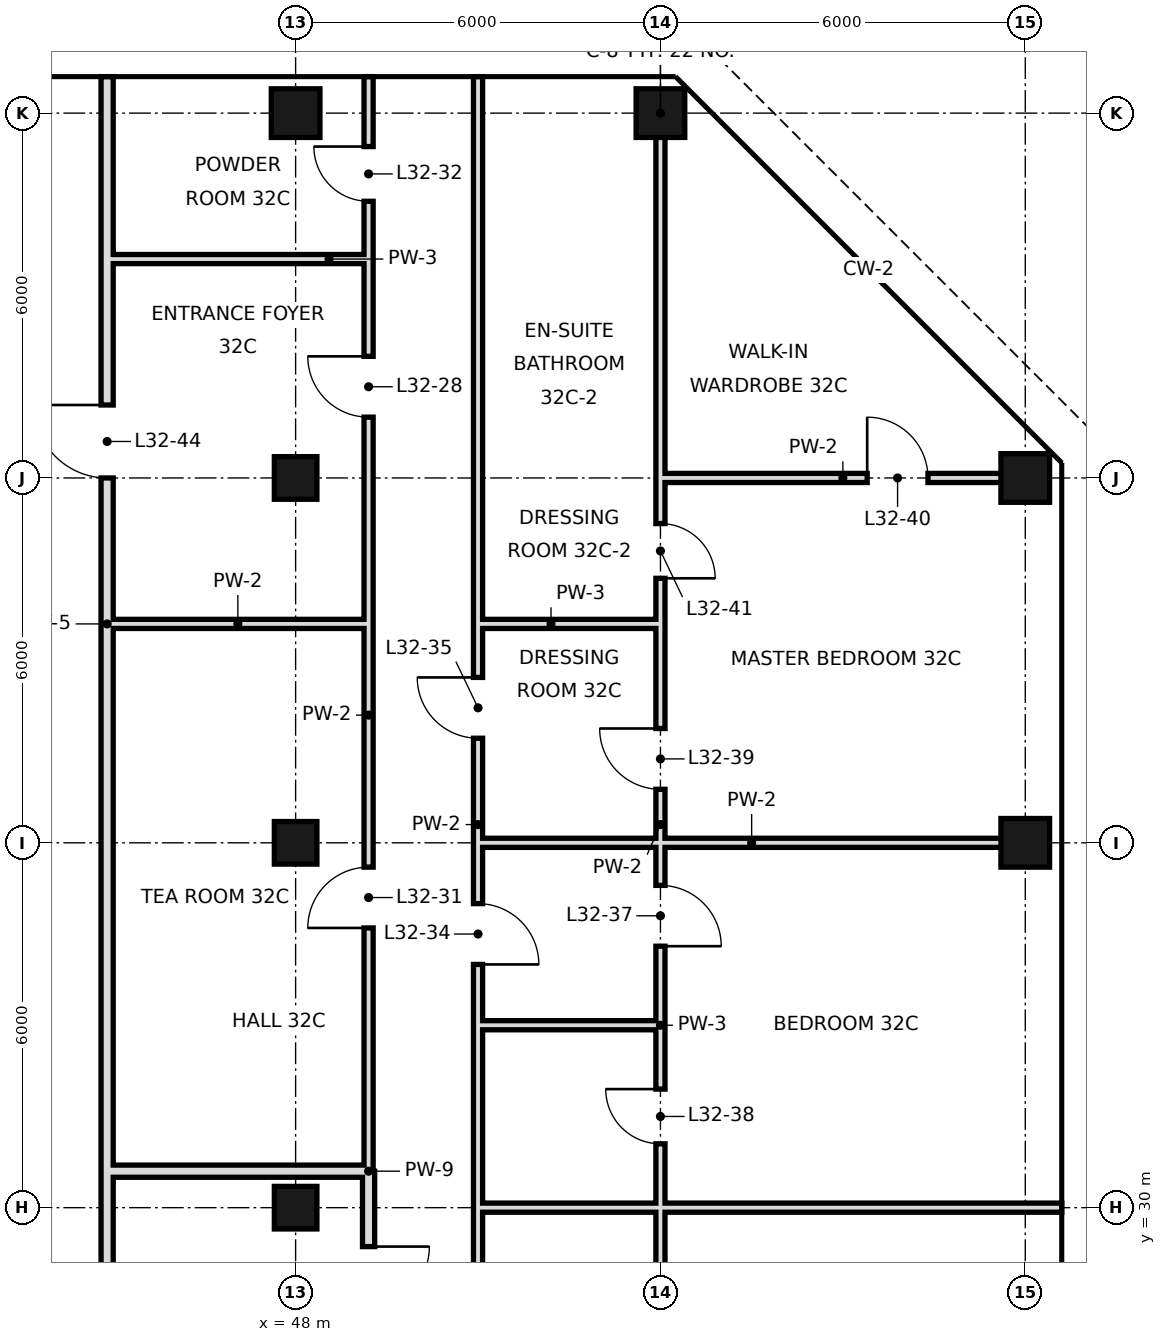
"""IFC4 building model, lengths in metres.
Left out: names, types, materials, properties, quantities, classifications, styles, units other than length and angle.
Written with IfcOpenShell. Run it as: python <this file> out.ifc"""

import sys

from ifc_helpers import new_model, si_unit, direction, frame, frame_2d, origin, origin_2d, place, context, subcontext, project, spatial, rectangle, hollow_rectangle, extrude, element, fill, save


model = new_model("IFC4")
c1 = context("Model", 3, precision=1e-05, world=origin(), true_north=direction((0.0, 1.0)))
c2 = subcontext(c1, "Body", "Model", "MODEL_VIEW")
j1 = project(units=[si_unit("LENGTHUNIT", "METRE"), si_unit("PLANEANGLEUNIT", "RADIAN")], contexts=[c1])
p1 = place(None, origin())
s1 = spatial("IfcSite", under=j1, at=p1, CompositionType="ELEMENT")
p2 = place(p1, origin())
s2 = spatial("IfcBuilding", under=s1, at=p2, CompositionType="ELEMENT")
p3 = place(p2, frame((0.0, 0.0, 143.8)))
s3 = spatial("IfcBuildingStorey", under=s2, at=p3, CompositionType="ELEMENT", Elevation=143.8)
for number, where, z_axis, x_axis in (
    (1, (48.0, 30.0, 0.0), (0.0, 0.0, 1.0), (1.0, 0.0, 0.0)),
    (2, (48.0, 36.0, 0.0), (0.0, 0.0, 1.0), (1.0, 0.0, 0.0)),
    (3, (48.0, 42.0, 0.0), (0.0, 0.0, 1.0), (1.0, 0.0, 0.0)),
):
    element("IfcColumn", number, at=place(p3, frame(where, z_axis=z_axis, x_axis=x_axis)), inside=s3, PredefinedType="COLUMN", context=c2, shape_type="SweptSolid", body=[
        extrude(hollow_rectangle(XDim=0.7, YDim=0.7, WallThickness=0.036, at=origin_2d()), origin(), (0.0, 0.0, 1.0), 3.6),
    ])
for number, where, z_axis, x_axis in (
    (4, (48.0, 48.0, 0.0), (0.0, 0.0, 1.0), (1.0, 0.0, 0.0)),
    (5, (54.0, 48.0, 0.0), (0.0, 0.0, 1.0), (1.0, 0.0, 0.0)),
    (6, (60.0, 36.0, 0.0), (0.0, 0.0, 1.0), (1.0, 0.0, 0.0)),
    (7, (60.0, 42.0, 0.0), (0.0, 0.0, 1.0), (1.0, 0.0, 0.0)),
):
    element("IfcColumn", number, at=place(p3, frame(where, z_axis=z_axis, x_axis=x_axis)), inside=s3, PredefinedType="COLUMN", context=c2, shape_type="SweptSolid", body=[
        extrude(hollow_rectangle(XDim=0.8, YDim=0.8, WallThickness=0.04, at=origin_2d()), origin(), (0.0, 0.0, 1.0), 3.6),
    ])
p4 = place(p3, frame((44.9, 30.6, 0.0), z_axis=(0.0, 0.0, 1.0), x_axis=(0.0, 1.0, 0.0)))
e8 = element("IfcWall", 8, at=p4, inside=s3, PredefinedType="SOLIDWALL", context=c2, shape_type="SweptSolid", body=[
    extrude(rectangle(XDim=18.0, YDim=0.2, at=frame_2d((9.0, 0.0))), origin(), (0.0, 0.0, 1.0), 2.72),
])
p5 = place(p4, frame((11.4, 0.0, 0.0)))
e9 = element("IfcOpeningElement", 9, at=p5, cuts=e8, PredefinedType="OPENING", context=c2, shape_type="SweptSolid", body=[
    extrude(rectangle(XDim=1.2, YDim=2.4, at=frame_2d((0.6, 1.2))), frame((0.0, 0.11, 0.0), z_axis=(0.0, -1.0, 0.0), x_axis=(1.0, 0.0, 0.0)), (0.0, 0.0, 1.0), 0.22),
])
p6 = place(p3, frame((44.9, 25.8, 0.0), z_axis=(0.0, 0.0, 1.0), x_axis=(0.0, 1.0, 0.0)))
e10 = element("IfcWall", 10, at=p6, inside=s3, PredefinedType="SOLIDWALL", context=c2, shape_type="SweptSolid", body=[
    extrude(rectangle(XDim=4.8, YDim=0.2, at=frame_2d((2.4, 0.0))), origin(), (0.0, 0.0, 1.0), 2.97),
])
p7 = place(p3, frame((49.2, 25.8, 0.0), z_axis=(0.0, 0.0, 1.0), x_axis=(0.0, 1.0, 0.0)))
e11 = element("IfcWall", 11, at=p7, inside=s3, PredefinedType="SOLIDWALL", context=c2, shape_type="SweptSolid", body=[
    extrude(rectangle(XDim=4.8, YDim=0.2, at=frame_2d((2.4, 0.0))), origin(), (0.0, 0.0, 1.0), 2.72),
])
p8 = place(p7, frame((2.56, 0.0, 0.0)))
e12 = element("IfcOpeningElement", 12, at=p8, cuts=e11, PredefinedType="OPENING", context=c2, shape_type="SweptSolid", body=[
    extrude(rectangle(XDim=1.0, YDim=2.4, at=frame_2d((0.5, 1.2))), frame((0.0, 0.11, 0.0), z_axis=(0.0, -1.0, 0.0), x_axis=(1.0, 0.0, 0.0)), (0.0, 0.0, 1.0), 0.22),
])
p9 = place(p3, frame((49.2, 30.6, 0.0), z_axis=(0.0, 0.0, 1.0), x_axis=(0.0, 1.0, 0.0)))
e13 = element("IfcWall", 13, at=p9, inside=s3, PredefinedType="PARTITIONING", context=c2, shape_type="SweptSolid", body=[
    extrude(rectangle(XDim=15.0, YDim=0.15, at=frame_2d((7.5, 0.0))), origin(), (0.0, 0.0, 1.0), 3.42),
])
p10 = place(p9, frame((12.4, 0.0, 0.0)))
e14 = element("IfcOpeningElement", 14, at=p10, cuts=e13, PredefinedType="OPENING", context=c2, shape_type="SweptSolid", body=[
    extrude(rectangle(XDim=1.0, YDim=2.4, at=frame_2d((0.5, 1.2))), frame((0.0, 0.085, 0.0), z_axis=(0.0, -1.0, 0.0), x_axis=(1.0, 0.0, 0.0)), (0.0, 0.0, 1.0), 0.17),
])
p11 = place(p9, frame((4.0, 0.0, 0.0)))
e15 = element("IfcOpeningElement", 15, at=p11, cuts=e13, PredefinedType="OPENING", context=c2, shape_type="SweptSolid", body=[
    extrude(rectangle(XDim=1.0, YDim=2.4, at=frame_2d((0.5, 1.2))), frame((0.0, 0.085, 0.0), z_axis=(0.0, -1.0, 0.0), x_axis=(1.0, 0.0, 0.0)), (0.0, 0.0, 1.0), 0.17),
])
p12 = place(p3, frame((49.2, 45.6, 0.0), z_axis=(0.0, 0.0, 1.0), x_axis=(0.0, 1.0, 0.0)))
e16 = element("IfcWall", 16, at=p12, inside=s3, PredefinedType="PARTITIONING", context=c2, shape_type="SweptSolid", body=[
    extrude(rectangle(XDim=3.0, YDim=0.15, at=frame_2d((1.5, 0.0))), origin(), (0.0, 0.0, 1.0), 3.42),
])
p13 = place(p12, frame((0.95, 0.0, 0.0)))
e17 = element("IfcOpeningElement", 17, at=p13, cuts=e16, PredefinedType="OPENING", context=c2, shape_type="SweptSolid", body=[
    extrude(rectangle(XDim=0.9, YDim=2.4, at=frame_2d((0.45, 1.2))), frame((0.0, 0.085, 0.0), z_axis=(0.0, -1.0, 0.0), x_axis=(1.0, 0.0, 0.0)), (0.0, 0.0, 1.0), 0.17),
])
p14 = place(p3, frame((51.0, 18.0, 0.0), z_axis=(0.0, 0.0, 1.0), x_axis=(0.0, 1.0, 0.0)))
e18 = element("IfcWall", 18, at=p14, inside=s3, PredefinedType="PARTITIONING", context=c2, shape_type="SweptSolid", body=[
    extrude(rectangle(XDim=12.0, YDim=0.15, at=frame_2d((6.0, 0.0))), origin(), (0.0, 0.0, 1.0), 3.42),
])
p15 = place(p14, frame((5.1, 0.0, 0.0)))
e19 = element("IfcOpeningElement", 19, at=p15, cuts=e18, PredefinedType="OPENING", context=c2, shape_type="SweptSolid", body=[
    extrude(rectangle(XDim=1.8, YDim=2.4, at=frame_2d((0.9, 1.2))), frame((0.0, 0.085, 0.0), z_axis=(0.0, -1.0, 0.0), x_axis=(1.0, 0.0, 0.0)), (0.0, 0.0, 1.0), 0.17),
])
p16 = place(p3, frame((51.0, 33.0, 0.0), z_axis=(0.0, 0.0, 1.0), x_axis=(0.0, 1.0, 0.0)))
e20 = element("IfcWall", 20, at=p16, inside=s3, PredefinedType="PARTITIONING", context=c2, shape_type="SweptSolid", body=[
    extrude(rectangle(XDim=6.6, YDim=0.15, at=frame_2d((3.3, 0.0))), origin(), (0.0, 0.0, 1.0), 3.42),
])
p17 = place(p16, frame((1.0, 0.0, 0.0)))
e21 = element("IfcOpeningElement", 21, at=p17, cuts=e20, PredefinedType="OPENING", context=c2, shape_type="SweptSolid", body=[
    extrude(rectangle(XDim=1.0, YDim=2.4, at=frame_2d((0.5, 1.2))), frame((0.0, 0.085, 0.0), z_axis=(0.0, -1.0, 0.0), x_axis=(1.0, 0.0, 0.0)), (0.0, 0.0, 1.0), 0.17),
])
p18 = place(p16, frame((4.72, 0.0, 0.0)))
e22 = element("IfcOpeningElement", 22, at=p18, cuts=e20, PredefinedType="OPENING", context=c2, shape_type="SweptSolid", body=[
    extrude(rectangle(XDim=1.0, YDim=2.4, at=frame_2d((0.5, 1.2))), frame((0.0, 0.085, 0.0), z_axis=(0.0, -1.0, 0.0), x_axis=(1.0, 0.0, 0.0)), (0.0, 0.0, 1.0), 0.17),
])
p19 = place(p3, frame((51.0, 30.0, 0.0), z_axis=(0.0, 0.0, 1.0), x_axis=(0.0, 1.0, 0.0)))
e23 = element("IfcWall", 23, at=p19, inside=s3, PredefinedType="PARTITIONING", context=c2, shape_type="SweptSolid", body=[
    extrude(rectangle(XDim=3.0, YDim=0.15, at=frame_2d((1.5, 0.0))), origin(), (0.0, 0.0, 1.0), 3.42),
])
p20 = place(p3, frame((51.0, 39.6, 0.0), z_axis=(0.0, 0.0, 1.0), x_axis=(0.0, 1.0, 0.0)))
e24 = element("IfcWall", 24, at=p20, inside=s3, PredefinedType="PARTITIONING", context=c2, shape_type="SweptSolid", body=[
    extrude(rectangle(XDim=9.0, YDim=0.15, at=frame_2d((4.5, 0.0))), origin(), (0.0, 0.0, 1.0), 3.42),
])
p21 = place(p3, frame((54.0, 18.0, 0.0), z_axis=(0.0, 0.0, 1.0), x_axis=(0.0, 1.0, 0.0)))
e25 = element("IfcWall", 25, at=p21, inside=s3, PredefinedType="PARTITIONING", context=c2, shape_type="SweptSolid", body=[
    extrude(rectangle(XDim=12.0, YDim=0.15, at=frame_2d((6.0, 0.0))), origin(), (0.0, 0.0, 1.0), 3.42),
])
p22 = place(p21, frame((3.16, 0.0, 0.0)))
e26 = element("IfcOpeningElement", 26, at=p22, cuts=e25, PredefinedType="OPENING", context=c2, shape_type="SweptSolid", body=[
    extrude(rectangle(XDim=1.8, YDim=2.4, at=frame_2d((0.9, 1.2))), frame((0.0, 0.085, 0.0), z_axis=(0.0, -1.0, 0.0), x_axis=(1.0, 0.0, 0.0)), (0.0, 0.0, 1.0), 0.17),
])
p23 = place(p3, frame((54.0, 33.0, 0.0), z_axis=(0.0, 0.0, 1.0), x_axis=(0.0, 1.0, 0.0)))
e27 = element("IfcWall", 27, at=p23, inside=s3, PredefinedType="PARTITIONING", context=c2, shape_type="SweptSolid", body=[
    extrude(rectangle(XDim=6.6, YDim=0.15, at=frame_2d((3.3, 0.0))), origin(), (0.0, 0.0, 1.0), 3.42),
])
p24 = place(p23, frame((1.3, 0.0, 0.0)))
e28 = element("IfcOpeningElement", 28, at=p24, cuts=e27, PredefinedType="OPENING", context=c2, shape_type="SweptSolid", body=[
    extrude(rectangle(XDim=1.0, YDim=2.4, at=frame_2d((0.5, 1.2))), frame((0.0, 0.085, 0.0), z_axis=(0.0, -1.0, 0.0), x_axis=(1.0, 0.0, 0.0)), (0.0, 0.0, 1.0), 0.17),
])
p25 = place(p23, frame((3.88, 0.0, 0.0)))
e29 = element("IfcOpeningElement", 29, at=p25, cuts=e27, PredefinedType="OPENING", context=c2, shape_type="SweptSolid", body=[
    extrude(rectangle(XDim=1.0, YDim=2.4, at=frame_2d((0.5, 1.2))), frame((0.0, 0.085, 0.0), z_axis=(0.0, -1.0, 0.0), x_axis=(1.0, 0.0, 0.0)), (0.0, 0.0, 1.0), 0.17),
])
p26 = place(p3, frame((54.0, 30.0, 0.0), z_axis=(0.0, 0.0, 1.0), x_axis=(0.0, 1.0, 0.0)))
e30 = element("IfcWall", 30, at=p26, inside=s3, PredefinedType="PARTITIONING", context=c2, shape_type="SweptSolid", body=[
    extrude(rectangle(XDim=3.0, YDim=0.15, at=frame_2d((1.5, 0.0))), origin(), (0.0, 0.0, 1.0), 3.42),
])
p27 = place(p26, frame((1.05, 0.0, 0.0)))
e31 = element("IfcOpeningElement", 31, at=p27, cuts=e30, PredefinedType="OPENING", context=c2, shape_type="SweptSolid", body=[
    extrude(rectangle(XDim=0.9, YDim=2.4, at=frame_2d((0.45, 1.2))), frame((0.0, 0.085, 0.0), z_axis=(0.0, -1.0, 0.0), x_axis=(1.0, 0.0, 0.0)), (0.0, 0.0, 1.0), 0.17),
])
p28 = place(p3, frame((54.0, 39.6, 0.0), z_axis=(0.0, 0.0, 1.0), x_axis=(0.0, 1.0, 0.0)))
e32 = element("IfcWall", 32, at=p28, inside=s3, PredefinedType="PARTITIONING", context=c2, shape_type="SweptSolid", body=[
    extrude(rectangle(XDim=8.4, YDim=0.15, at=frame_2d((4.2, 0.0))), origin(), (0.0, 0.0, 1.0), 3.42),
])
p29 = place(p28, frame((0.75, 0.0, 0.0)))
e33 = element("IfcOpeningElement", 33, at=p29, cuts=e32, PredefinedType="OPENING", context=c2, shape_type="SweptSolid", body=[
    extrude(rectangle(XDim=0.9, YDim=2.4, at=frame_2d((0.45, 1.2))), frame((0.0, 0.085, 0.0), z_axis=(0.0, -1.0, 0.0), x_axis=(1.0, 0.0, 0.0)), (0.0, 0.0, 1.0), 0.17),
])
p30 = place(p3, frame((54.0, 30.0, 0.0), z_axis=(0.0, 0.0, 1.0), x_axis=(1.0, 0.0, 0.0)))
e34 = element("IfcWall", 34, at=p30, inside=s3, PredefinedType="PARTITIONING", context=c2, shape_type="SweptSolid", body=[
    extrude(rectangle(XDim=6.6, YDim=0.15, at=frame_2d((3.3, 0.0))), origin(), (0.0, 0.0, 1.0), 2.72),
])
p31 = place(p3, frame((51.0, 30.0, 0.0), z_axis=(0.0, 0.0, 1.0), x_axis=(1.0, 0.0, 0.0)))
e35 = element("IfcWall", 35, at=p31, inside=s3, PredefinedType="PARTITIONING", context=c2, shape_type="SweptSolid", body=[
    extrude(rectangle(XDim=3.0, YDim=0.15, at=frame_2d((1.5, 0.0))), origin(), (0.0, 0.0, 1.0), 2.72),
])
p32 = place(p3, frame((44.9, 30.6, 0.0), z_axis=(0.0, 0.0, 1.0), x_axis=(1.0, 0.0, 0.0)))
e36 = element("IfcWall", 36, at=p32, inside=s3, PredefinedType="SOLIDWALL", context=c2, shape_type="SweptSolid", body=[
    extrude(rectangle(XDim=4.3, YDim=0.2, at=frame_2d((2.15, 0.0))), origin(), (0.0, 0.0, 1.0), 2.97),
])
p33 = place(p3, frame((51.0, 33.0, 0.0), z_axis=(0.0, 0.0, 1.0), x_axis=(1.0, 0.0, 0.0)))
e37 = element("IfcWall", 37, at=p33, inside=s3, PredefinedType="PARTITIONING", context=c2, shape_type="SweptSolid", body=[
    extrude(rectangle(XDim=3.0, YDim=0.15, at=frame_2d((1.5, 0.0))), origin(), (0.0, 0.0, 1.0), 3.42),
])
p34 = place(p3, frame((51.0, 36.0, 0.0), z_axis=(0.0, 0.0, 1.0), x_axis=(1.0, 0.0, 0.0)))
e38 = element("IfcWall", 38, at=p34, inside=s3, PredefinedType="PARTITIONING", context=c2, shape_type="SweptSolid", body=[
    extrude(rectangle(XDim=9.0, YDim=0.15, at=frame_2d((4.5, 0.0))), origin(), (0.0, 0.0, 1.0), 2.72),
])
p35 = place(p3, frame((44.9, 39.6, 0.0), z_axis=(0.0, 0.0, 1.0), x_axis=(1.0, 0.0, 0.0)))
e39 = element("IfcWall", 39, at=p35, inside=s3, PredefinedType="PARTITIONING", context=c2, shape_type="SweptSolid", body=[
    extrude(rectangle(XDim=4.3, YDim=0.15, at=frame_2d((2.15, 0.0))), origin(), (0.0, 0.0, 1.0), 3.42),
])
p36 = place(p3, frame((51.0, 39.6, 0.0), z_axis=(0.0, 0.0, 1.0), x_axis=(1.0, 0.0, 0.0)))
e40 = element("IfcWall", 40, at=p36, inside=s3, PredefinedType="PARTITIONING", context=c2, shape_type="SweptSolid", body=[
    extrude(rectangle(XDim=3.0, YDim=0.15, at=frame_2d((1.5, 0.0))), origin(), (0.0, 0.0, 1.0), 3.42),
])
p37 = place(p3, frame((54.0, 42.0, 0.0), z_axis=(0.0, 0.0, 1.0), x_axis=(1.0, 0.0, 0.0)))
e41 = element("IfcWall", 41, at=p37, inside=s3, PredefinedType="PARTITIONING", context=c2, shape_type="SweptSolid", body=[
    extrude(rectangle(XDim=6.0, YDim=0.15, at=frame_2d((3.0, 0.0))), origin(), (0.0, 0.0, 1.0), 2.72),
])
p38 = place(p37, frame((3.4, 0.0, 0.0)))
e42 = element("IfcOpeningElement", 42, at=p38, cuts=e41, PredefinedType="OPENING", context=c2, shape_type="SweptSolid", body=[
    extrude(rectangle(XDim=1.0, YDim=2.4, at=frame_2d((0.5, 1.2))), frame((0.0, 0.085, 0.0), z_axis=(0.0, -1.0, 0.0), x_axis=(1.0, 0.0, 0.0)), (0.0, 0.0, 1.0), 0.17),
])
p39 = place(p3, frame((44.9, 45.6, 0.0), z_axis=(0.0, 0.0, 1.0), x_axis=(1.0, 0.0, 0.0)))
e43 = element("IfcWall", 43, at=p39, inside=s3, PredefinedType="PARTITIONING", context=c2, shape_type="SweptSolid", body=[
    extrude(rectangle(XDim=4.3, YDim=0.15, at=frame_2d((2.15, 0.0))), origin(), (0.0, 0.0, 1.0), 3.42),
])
p40 = place(p10, frame((1.0, 0.0, 0.0), z_axis=(0.0, 0.0, 1.0), x_axis=(-1.0, 0.0, 0.0)))
e44 = element("IfcDoor", 44, at=p40, inside=s3, OperationType="SINGLE_SWING_LEFT", PredefinedType="DOOR", context=c2, shape_type="SweptSolid", body=[
    extrude(rectangle(XDim=1.0, YDim=2.4, at=frame_2d((0.5, 1.2))), frame((0.0, 0.025, 0.0), z_axis=(0.0, -1.0, 0.0), x_axis=(1.0, 0.0, 0.0)), (0.0, 0.0, 1.0), 0.05),
])
fill(e14, e44)
p41 = place(p8, origin())
e45 = element("IfcDoor", 45, at=p41, inside=s3, OperationType="SINGLE_SWING_RIGHT", PredefinedType="DOOR", context=c2, shape_type="SweptSolid", body=[
    extrude(rectangle(XDim=1.0, YDim=2.4, at=frame_2d((0.5, 1.2))), frame((0.0, 0.025, 0.0), z_axis=(0.0, -1.0, 0.0), x_axis=(1.0, 0.0, 0.0)), (0.0, 0.0, 1.0), 0.05),
])
fill(e12, e45)
p42 = place(p11, origin())
e46 = element("IfcDoor", 46, at=p42, inside=s3, OperationType="SINGLE_SWING_LEFT", PredefinedType="DOOR", context=c2, shape_type="SweptSolid", body=[
    extrude(rectangle(XDim=1.0, YDim=2.4, at=frame_2d((0.5, 1.2))), frame((0.0, 0.025, 0.0), z_axis=(0.0, -1.0, 0.0), x_axis=(1.0, 0.0, 0.0)), (0.0, 0.0, 1.0), 0.05),
])
fill(e15, e46)
p43 = place(p13, frame((0.9, 0.0, 0.0), z_axis=(0.0, 0.0, 1.0), x_axis=(-1.0, 0.0, 0.0)))
e47 = element("IfcDoor", 47, at=p43, inside=s3, OperationType="SINGLE_SWING_LEFT", PredefinedType="DOOR", context=c2, shape_type="SweptSolid", body=[
    extrude(rectangle(XDim=0.9, YDim=2.4, at=frame_2d((0.45, 1.2))), frame((0.0, 0.025, 0.0), z_axis=(0.0, -1.0, 0.0), x_axis=(1.0, 0.0, 0.0)), (0.0, 0.0, 1.0), 0.05),
])
fill(e17, e47)
p44 = place(p17, frame((1.0, 0.0, 0.0), z_axis=(0.0, 0.0, 1.0), x_axis=(-1.0, 0.0, 0.0)))
e48 = element("IfcDoor", 48, at=p44, inside=s3, OperationType="SINGLE_SWING_RIGHT", PredefinedType="DOOR", context=c2, shape_type="SweptSolid", body=[
    extrude(rectangle(XDim=1.0, YDim=2.4, at=frame_2d((0.5, 1.2))), frame((0.0, 0.025, 0.0), z_axis=(0.0, -1.0, 0.0), x_axis=(1.0, 0.0, 0.0)), (0.0, 0.0, 1.0), 0.05),
])
fill(e21, e48)
p45 = place(p18, frame((1.0, 0.0, 0.0), z_axis=(0.0, 0.0, 1.0), x_axis=(-1.0, 0.0, 0.0)))
e49 = element("IfcDoor", 49, at=p45, inside=s3, OperationType="SINGLE_SWING_LEFT", PredefinedType="DOOR", context=c2, shape_type="SweptSolid", body=[
    extrude(rectangle(XDim=1.0, YDim=2.4, at=frame_2d((0.5, 1.2))), frame((0.0, 0.025, 0.0), z_axis=(0.0, -1.0, 0.0), x_axis=(1.0, 0.0, 0.0)), (0.0, 0.0, 1.0), 0.05),
])
fill(e22, e49)
p46 = place(p24, frame((1.0, 0.0, 0.0), z_axis=(0.0, 0.0, 1.0), x_axis=(-1.0, 0.0, 0.0)))
e50 = element("IfcDoor", 50, at=p46, inside=s3, OperationType="SINGLE_SWING_RIGHT", PredefinedType="DOOR", context=c2, shape_type="SweptSolid", body=[
    extrude(rectangle(XDim=1.0, YDim=2.4, at=frame_2d((0.5, 1.2))), frame((0.0, 0.025, 0.0), z_axis=(0.0, -1.0, 0.0), x_axis=(1.0, 0.0, 0.0)), (0.0, 0.0, 1.0), 0.05),
])
fill(e28, e50)
p47 = place(p27, frame((0.9, 0.0, 0.0), z_axis=(0.0, 0.0, 1.0), x_axis=(-1.0, 0.0, 0.0)))
e51 = element("IfcDoor", 51, at=p47, inside=s3, OperationType="SINGLE_SWING_LEFT", PredefinedType="DOOR", context=c2, shape_type="SweptSolid", body=[
    extrude(rectangle(XDim=0.9, YDim=2.4, at=frame_2d((0.45, 1.2))), frame((0.0, 0.025, 0.0), z_axis=(0.0, -1.0, 0.0), x_axis=(1.0, 0.0, 0.0)), (0.0, 0.0, 1.0), 0.05),
])
fill(e31, e51)
p48 = place(p25, frame((1.0, 0.0, 0.0), z_axis=(0.0, 0.0, 1.0), x_axis=(-1.0, 0.0, 0.0)))
e52 = element("IfcDoor", 52, at=p48, inside=s3, OperationType="SINGLE_SWING_LEFT", PredefinedType="DOOR", context=c2, shape_type="SweptSolid", body=[
    extrude(rectangle(XDim=1.0, YDim=2.4, at=frame_2d((0.5, 1.2))), frame((0.0, 0.025, 0.0), z_axis=(0.0, -1.0, 0.0), x_axis=(1.0, 0.0, 0.0)), (0.0, 0.0, 1.0), 0.05),
])
fill(e29, e52)
p49 = place(p38, origin())
e53 = element("IfcDoor", 53, at=p49, inside=s3, OperationType="SINGLE_SWING_LEFT", PredefinedType="DOOR", context=c2, shape_type="SweptSolid", body=[
    extrude(rectangle(XDim=1.0, YDim=2.4, at=frame_2d((0.5, 1.2))), frame((0.0, 0.025, 0.0), z_axis=(0.0, -1.0, 0.0), x_axis=(1.0, 0.0, 0.0)), (0.0, 0.0, 1.0), 0.05),
])
fill(e42, e53)
p50 = place(p29, frame((0.9, 0.0, 0.0), z_axis=(0.0, 0.0, 1.0), x_axis=(-1.0, 0.0, 0.0)))
e54 = element("IfcDoor", 54, at=p50, inside=s3, OperationType="SINGLE_SWING_RIGHT", PredefinedType="DOOR", context=c2, shape_type="SweptSolid", body=[
    extrude(rectangle(XDim=0.9, YDim=2.4, at=frame_2d((0.45, 1.2))), frame((0.0, 0.025, 0.0), z_axis=(0.0, -1.0, 0.0), x_axis=(1.0, 0.0, 0.0)), (0.0, 0.0, 1.0), 0.05),
])
fill(e33, e54)
p51 = place(p5, frame((1.2, 0.0, 0.0), z_axis=(0.0, 0.0, 1.0), x_axis=(-1.0, 0.0, 0.0)))
e55 = element("IfcDoor", 55, at=p51, inside=s3, OperationType="SINGLE_SWING_LEFT", PredefinedType="DOOR", context=c2, shape_type="SweptSolid", body=[
    extrude(rectangle(XDim=1.2, YDim=2.4, at=frame_2d((0.6, 1.2))), frame((0.0, 0.025, 0.0), z_axis=(0.0, -1.0, 0.0), x_axis=(1.0, 0.0, 0.0)), (0.0, 0.0, 1.0), 0.05),
])
fill(e9, e55)
save(model, sys.argv[1])
